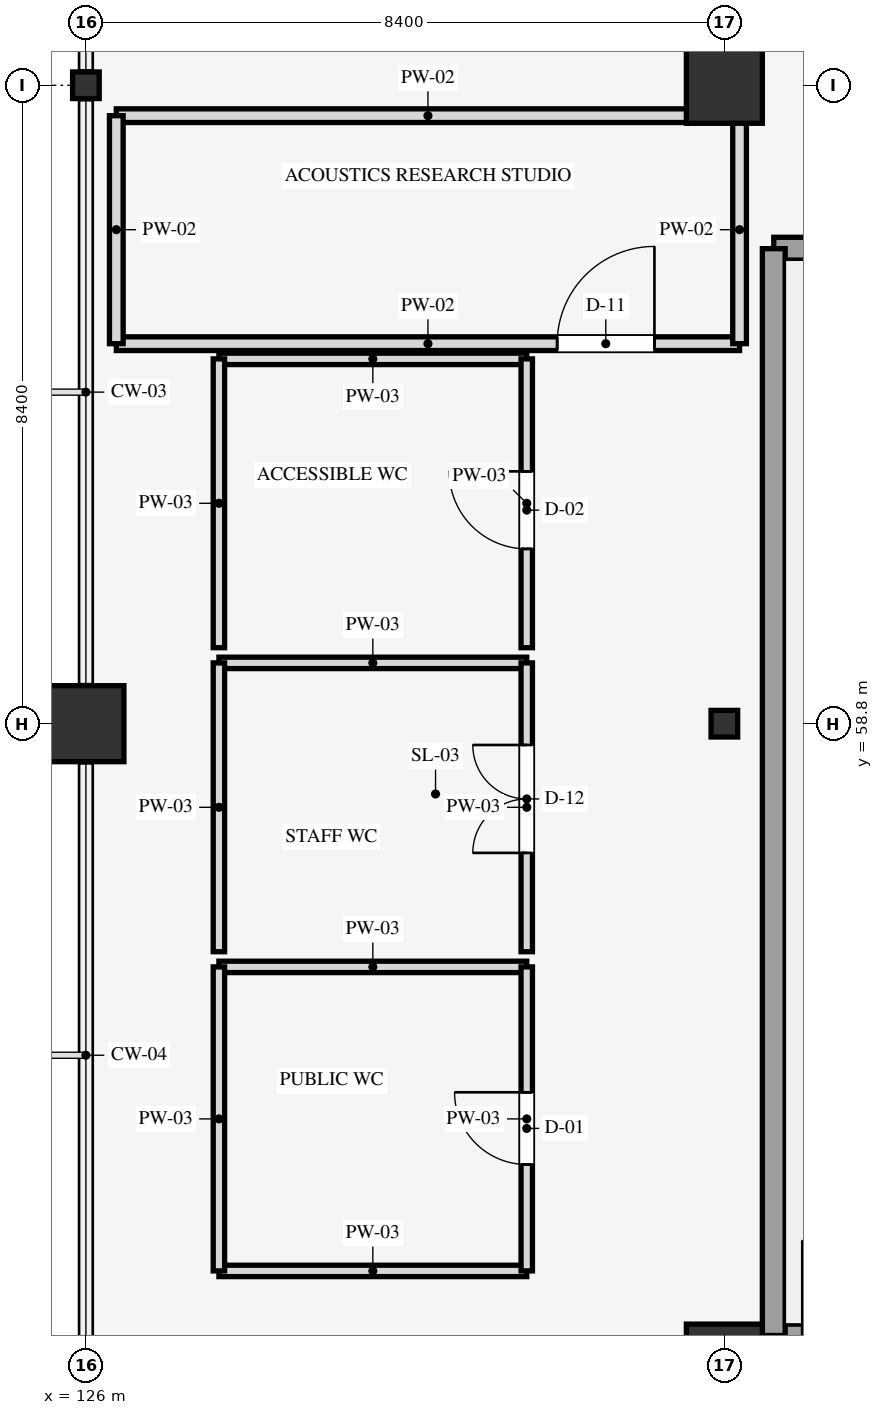
"""IFC4 building model, lengths in metres.
Left out: names, types, materials, properties, quantities, classifications, styles, units other than length and angle.
Written with IfcOpenShell. Run it as: python <this file> out.ifc"""

import sys

from ifc_helpers import new_model, si_unit, direction, frame, frame_2d, origin, origin_2d, place, context, subcontext, project, spatial, rectangle, i_section, extrude, element, fill, save


model = new_model("IFC4")
c1 = context("Model", 3, precision=1e-05, world=origin(), true_north=direction((0.0, 1.0)))
c2 = subcontext(c1, "Body", "Model", "MODEL_VIEW")
j1 = project(units=[si_unit("LENGTHUNIT", "METRE"), si_unit("PLANEANGLEUNIT", "RADIAN")], contexts=[c1])
p1 = place(None, origin())
s1 = spatial("IfcSite", under=j1, at=p1, CompositionType="ELEMENT")
p2 = place(p1, origin())
s2 = spatial("IfcBuilding", under=s1, at=p2, CompositionType="ELEMENT")
p3 = place(p2, frame((0.0, 0.0, 44.7)))
s3 = spatial("IfcBuildingStorey", under=s2, at=p3, CompositionType="ELEMENT", Elevation=44.7)
p4 = place(p3, frame((126.0, 58.8, 0.0), z_axis=(0.0, 0.0, 1.0), x_axis=(1.0, 0.0, 0.0)))
e1 = element("IfcColumn", 1, at=p4, inside=s3, PredefinedType="COLUMN", context=c2, shape_type="SweptSolid", body=[
    extrude(rectangle(XDim=1.0, YDim=1.0, at=origin_2d()), origin(), (0.0, 0.0, 1.0), 4.2),
])
p5 = place(p3, frame((126.0, 67.2, 0.0), z_axis=(0.0, 0.0, 1.0), x_axis=(1.0, 0.0, 0.0)))
e2 = element("IfcColumn", 2, at=p5, inside=s3, PredefinedType="COLUMN", context=c2, shape_type="SweptSolid", body=[
    extrude(i_section(OverallWidth=0.35, OverallDepth=0.35, WebThickness=0.012, FlangeThickness=0.019, FilletRadius=0.02, at=origin_2d()), origin(), (0.0, 0.0, 1.0), 4.2),
])
p6 = place(p3, frame((134.4, 50.4, 0.0), z_axis=(0.0, 0.0, 1.0), x_axis=(1.0, 0.0, 0.0)))
e3 = element("IfcColumn", 3, at=p6, inside=s3, PredefinedType="COLUMN", context=c2, shape_type="SweptSolid", body=[
    extrude(rectangle(XDim=1.0, YDim=1.0, at=origin_2d()), origin(), (0.0, 0.0, 1.0), 4.2),
])
p7 = place(p3, frame((134.4, 58.8, 0.0), z_axis=(0.0, 0.0, 1.0), x_axis=(1.0, 0.0, 0.0)))
e4 = element("IfcColumn", 4, at=p7, inside=s3, PredefinedType="COLUMN", context=c2, shape_type="SweptSolid", body=[
    extrude(i_section(OverallWidth=0.35, OverallDepth=0.35, WebThickness=0.012, FlangeThickness=0.019, FilletRadius=0.02, at=origin_2d()), origin(), (0.0, 0.0, 1.0), 4.2),
])
p8 = place(p3, frame((134.4, 67.2, 0.0), z_axis=(0.0, 0.0, 1.0), x_axis=(1.0, 0.0, 0.0)))
e5 = element("IfcColumn", 5, at=p8, inside=s3, PredefinedType="COLUMN", context=c2, shape_type="SweptSolid", body=[
    extrude(rectangle(XDim=1.0, YDim=1.0, at=origin_2d()), origin(), (0.0, 0.0, 1.0), 4.2),
])
p9 = place(p3, frame((135.05, 50.75, 0.0), z_axis=(0.0, 0.0, 1.0), x_axis=(1.0, 0.0, 0.0)))
e6 = element("IfcWall", 6, at=p9, inside=s3, PredefinedType="SHEAR", context=c2, shape_type="SweptSolid", body=[
    extrude(rectangle(XDim=4.0, YDim=0.3, at=frame_2d((2.0, 0.0))), origin(), (0.0, 0.0, 1.0), 4.2),
])
p10 = place(p9, frame((0.375, 0.0, 0.0)))
e7 = element("IfcOpeningElement", 7, at=p10, cuts=e6, PredefinedType="OPENING", context=c2, shape_type="SweptSolid", body=[
    extrude(rectangle(XDim=1.25, YDim=2.15, at=frame_2d((0.625, 1.075))), frame((0.0, 0.16, 0.0), z_axis=(0.0, -1.0, 0.0), x_axis=(1.0, 0.0, 0.0)), (0.0, 0.0, 1.0), 0.32),
])
p11 = place(p3, frame((135.05, 65.05, 0.0), z_axis=(0.0, 0.0, 1.0), x_axis=(1.0, 0.0, 0.0)))
e8 = element("IfcWall", 8, at=p11, inside=s3, PredefinedType="SHEAR", context=c2, shape_type="SweptSolid", body=[
    extrude(rectangle(XDim=4.0, YDim=0.3, at=frame_2d((2.0, 0.0))), origin(), (0.0, 0.0, 1.0), 4.2),
])
p12 = place(p3, frame((135.05, 50.75, 0.0), z_axis=(0.0, 0.0, 1.0), x_axis=(0.0, 1.0, 0.0)))
e9 = element("IfcWall", 9, at=p12, inside=s3, PredefinedType="SHEAR", context=c2, shape_type="SweptSolid", body=[
    extrude(rectangle(XDim=14.3, YDim=0.3, at=frame_2d((7.15, 0.0))), origin(), (0.0, 0.0, 1.0), 4.2),
])
for number, where, z_axis, x_axis in (
    (10, (127.75, 51.6, 0.0), (0.0, 0.0, 1.0), (1.0, 0.0, 0.0)),
    (11, (127.75, 55.6, 0.0), (0.0, 0.0, 1.0), (1.0, 0.0, 0.0)),
):
    element("IfcWall", number, at=place(p3, frame(where, z_axis=z_axis, x_axis=x_axis)), inside=s3, PredefinedType="PARTITIONING", context=c2, shape_type="SweptSolid", body=[
        extrude(rectangle(XDim=4.05, YDim=0.15, at=frame_2d((2.025, 0.0))), origin(), (0.0, 0.0, 1.0), 3.24),
    ])
p13 = place(p3, frame((127.75, 51.6, 0.0), z_axis=(0.0, 0.0, 1.0), x_axis=(0.0, 1.0, 0.0)))
e12 = element("IfcWall", 12, at=p13, inside=s3, PredefinedType="PARTITIONING", context=c2, shape_type="SweptSolid", body=[
    extrude(rectangle(XDim=4.0, YDim=0.15, at=frame_2d((2.0, 0.0))), origin(), (0.0, 0.0, 1.0), 3.24),
])
p14 = place(p3, frame((131.8, 51.6, 0.0), z_axis=(0.0, 0.0, 1.0), x_axis=(0.0, 1.0, 0.0)))
e13 = element("IfcWall", 13, at=p14, inside=s3, PredefinedType="PARTITIONING", context=c2, shape_type="SweptSolid", body=[
    extrude(rectangle(XDim=4.0, YDim=0.15, at=frame_2d((2.0, 0.0))), origin(), (0.0, 0.0, 1.0), 3.24),
])
p15 = place(p14, frame((1.4, 0.0, 0.0)))
e14 = element("IfcOpeningElement", 14, at=p15, cuts=e13, PredefinedType="OPENING", context=c2, shape_type="SweptSolid", body=[
    extrude(rectangle(XDim=0.95, YDim=2.1, at=frame_2d((0.475, 1.05))), frame((0.0, 0.085, 0.0), z_axis=(0.0, -1.0, 0.0), x_axis=(1.0, 0.0, 0.0)), (0.0, 0.0, 1.0), 0.17),
])
p16 = place(p3, frame((127.75, 59.6, 0.0), z_axis=(0.0, 0.0, 1.0), x_axis=(1.0, 0.0, 0.0)))
e15 = element("IfcWall", 15, at=p16, inside=s3, PredefinedType="PARTITIONING", context=c2, shape_type="SweptSolid", body=[
    extrude(rectangle(XDim=4.05, YDim=0.15, at=frame_2d((2.025, 0.0))), origin(), (0.0, 0.0, 1.0), 3.24),
])
p17 = place(p3, frame((127.75, 55.8, 0.0), z_axis=(0.0, 0.0, 1.0), x_axis=(0.0, 1.0, 0.0)))
e16 = element("IfcWall", 16, at=p17, inside=s3, PredefinedType="PARTITIONING", context=c2, shape_type="SweptSolid", body=[
    extrude(rectangle(XDim=3.8, YDim=0.15, at=frame_2d((1.9, 0.0))), origin(), (0.0, 0.0, 1.0), 3.24),
])
p18 = place(p3, frame((131.8, 55.8, 0.0), z_axis=(0.0, 0.0, 1.0), x_axis=(0.0, 1.0, 0.0)))
e17 = element("IfcWall", 17, at=p18, inside=s3, PredefinedType="PARTITIONING", context=c2, shape_type="SweptSolid", body=[
    extrude(rectangle(XDim=3.8, YDim=0.15, at=frame_2d((1.9, 0.0))), origin(), (0.0, 0.0, 1.0), 3.24),
])
p19 = place(p18, frame((1.3, 0.0, 0.0)))
e18 = element("IfcOpeningElement", 18, at=p19, cuts=e17, PredefinedType="OPENING", context=c2, shape_type="SweptSolid", body=[
    extrude(rectangle(XDim=1.42, YDim=2.18, at=frame_2d((0.71, 1.09))), frame((0.0, 0.085, 0.0), z_axis=(0.0, -1.0, 0.0), x_axis=(1.0, 0.0, 0.0)), (0.0, 0.0, 1.0), 0.17),
])
p20 = place(p3, frame((127.75, 63.6, 0.0), z_axis=(0.0, 0.0, 1.0), x_axis=(1.0, 0.0, 0.0)))
e19 = element("IfcWall", 19, at=p20, inside=s3, PredefinedType="PARTITIONING", context=c2, shape_type="SweptSolid", body=[
    extrude(rectangle(XDim=4.05, YDim=0.15, at=frame_2d((2.025, 0.0))), origin(), (0.0, 0.0, 1.0), 3.24),
])
p21 = place(p3, frame((127.75, 59.8, 0.0), z_axis=(0.0, 0.0, 1.0), x_axis=(0.0, 1.0, 0.0)))
e20 = element("IfcWall", 20, at=p21, inside=s3, PredefinedType="PARTITIONING", context=c2, shape_type="SweptSolid", body=[
    extrude(rectangle(XDim=3.8, YDim=0.15, at=frame_2d((1.9, 0.0))), origin(), (0.0, 0.0, 1.0), 3.24),
])
p22 = place(p3, frame((131.8, 59.8, 0.0), z_axis=(0.0, 0.0, 1.0), x_axis=(0.0, 1.0, 0.0)))
e21 = element("IfcWall", 21, at=p22, inside=s3, PredefinedType="PARTITIONING", context=c2, shape_type="SweptSolid", body=[
    extrude(rectangle(XDim=3.8, YDim=0.15, at=frame_2d((1.9, 0.0))), origin(), (0.0, 0.0, 1.0), 3.24),
])
p23 = place(p22, frame((1.3, 0.0, 0.0)))
e22 = element("IfcOpeningElement", 22, at=p23, cuts=e21, PredefinedType="OPENING", context=c2, shape_type="SweptSolid", body=[
    extrude(rectangle(XDim=1.02, YDim=2.1, at=frame_2d((0.51, 1.05))), frame((0.0, 0.085, 0.0), z_axis=(0.0, -1.0, 0.0), x_axis=(1.0, 0.0, 0.0)), (0.0, 0.0, 1.0), 0.17),
])
p24 = place(p3, frame((126.4, 63.8, 0.0), z_axis=(0.0, 0.0, 1.0), x_axis=(1.0, 0.0, 0.0)))
e23 = element("IfcWall", 23, at=p24, inside=s3, PredefinedType="PARTITIONING", context=c2, shape_type="SweptSolid", body=[
    extrude(rectangle(XDim=8.2, YDim=0.18, at=frame_2d((4.1, 0.0))), origin(), (0.0, 0.0, 1.0), 3.24),
])
p25 = place(p24, frame((5.8, 0.0, 0.0)))
e24 = element("IfcOpeningElement", 24, at=p25, cuts=e23, PredefinedType="OPENING", context=c2, shape_type="SweptSolid", body=[
    extrude(rectangle(XDim=1.28, YDim=2.16, at=frame_2d((0.64, 1.08))), frame((0.0, 0.1, 0.0), z_axis=(0.0, -1.0, 0.0), x_axis=(1.0, 0.0, 0.0)), (0.0, 0.0, 1.0), 0.2),
])
p26 = place(p3, frame((126.4, 66.8, 0.0), z_axis=(0.0, 0.0, 1.0), x_axis=(1.0, 0.0, 0.0)))
e25 = element("IfcWall", 25, at=p26, inside=s3, PredefinedType="PARTITIONING", context=c2, shape_type="SweptSolid", body=[
    extrude(rectangle(XDim=8.2, YDim=0.18, at=frame_2d((4.1, 0.0))), origin(), (0.0, 0.0, 1.0), 3.24),
])
for number, where, z_axis, x_axis in (
    (26, (126.4, 63.8, 0.0), (0.0, 0.0, 1.0), (0.0, 1.0, 0.0)),
    (27, (134.6, 63.8, 0.0), (0.0, 0.0, 1.0), (0.0, 1.0, 0.0)),
):
    element("IfcWall", number, at=place(p3, frame(where, z_axis=z_axis, x_axis=x_axis)), inside=s3, PredefinedType="PARTITIONING", context=c2, shape_type="SweptSolid", body=[
        extrude(rectangle(XDim=3.0, YDim=0.18, at=frame_2d((1.5, 0.0))), origin(), (0.0, 0.0, 1.0), 3.24),
    ])
p27 = place(p10, origin())
e28 = element("IfcDoor", 28, at=p27, inside=s3, OperationType="SINGLE_SWING_LEFT", PredefinedType="DOOR", context=c2, shape_type="SweptSolid", body=[
    extrude(rectangle(XDim=1.25, YDim=2.15, at=frame_2d((0.625, 1.075))), frame((0.0, 0.025, 0.0), z_axis=(0.0, -1.0, 0.0), x_axis=(1.0, 0.0, 0.0)), (0.0, 0.0, 1.0), 0.05),
])
fill(e7, e28)
p28 = place(p15, origin())
e29 = element("IfcDoor", 29, at=p28, inside=s3, OperationType="SINGLE_SWING_RIGHT", PredefinedType="DOOR", context=c2, shape_type="SweptSolid", body=[
    extrude(rectangle(XDim=0.95, YDim=2.1, at=frame_2d((0.475, 1.05))), frame((0.0, 0.025, 0.0), z_axis=(0.0, -1.0, 0.0), x_axis=(1.0, 0.0, 0.0)), (0.0, 0.0, 1.0), 0.05),
])
fill(e14, e29)
p29 = place(p19, origin())
e30 = element("IfcDoor", 30, at=p29, inside=s3, OperationType="DOUBLE_DOOR_SINGLE_SWING", PredefinedType="DOOR", context=c2, shape_type="SweptSolid", body=[
    extrude(rectangle(XDim=1.42, YDim=2.18, at=frame_2d((0.71, 1.09))), frame((0.0, 0.025, 0.0), z_axis=(0.0, -1.0, 0.0), x_axis=(1.0, 0.0, 0.0)), (0.0, 0.0, 1.0), 0.05),
])
fill(e18, e30)
p30 = place(p23, origin())
e31 = element("IfcDoor", 31, at=p30, inside=s3, OperationType="SINGLE_SWING_RIGHT", PredefinedType="DOOR", context=c2, shape_type="SweptSolid", body=[
    extrude(rectangle(XDim=1.02, YDim=2.1, at=frame_2d((0.51, 1.05))), frame((0.0, 0.025, 0.0), z_axis=(0.0, -1.0, 0.0), x_axis=(1.0, 0.0, 0.0)), (0.0, 0.0, 1.0), 0.05),
])
fill(e22, e31)
p31 = place(p25, origin())
e32 = element("IfcDoor", 32, at=p31, inside=s3, OperationType="SINGLE_SWING_RIGHT", PredefinedType="DOOR", context=c2, shape_type="SweptSolid", body=[
    extrude(rectangle(XDim=1.28, YDim=2.16, at=frame_2d((0.64, 1.08))), frame((0.0, 0.025, 0.0), z_axis=(0.0, -1.0, 0.0), x_axis=(1.0, 0.0, 0.0)), (0.0, 0.0, 1.0), 0.05),
])
fill(e24, e32)
save(model, sys.argv[1])
